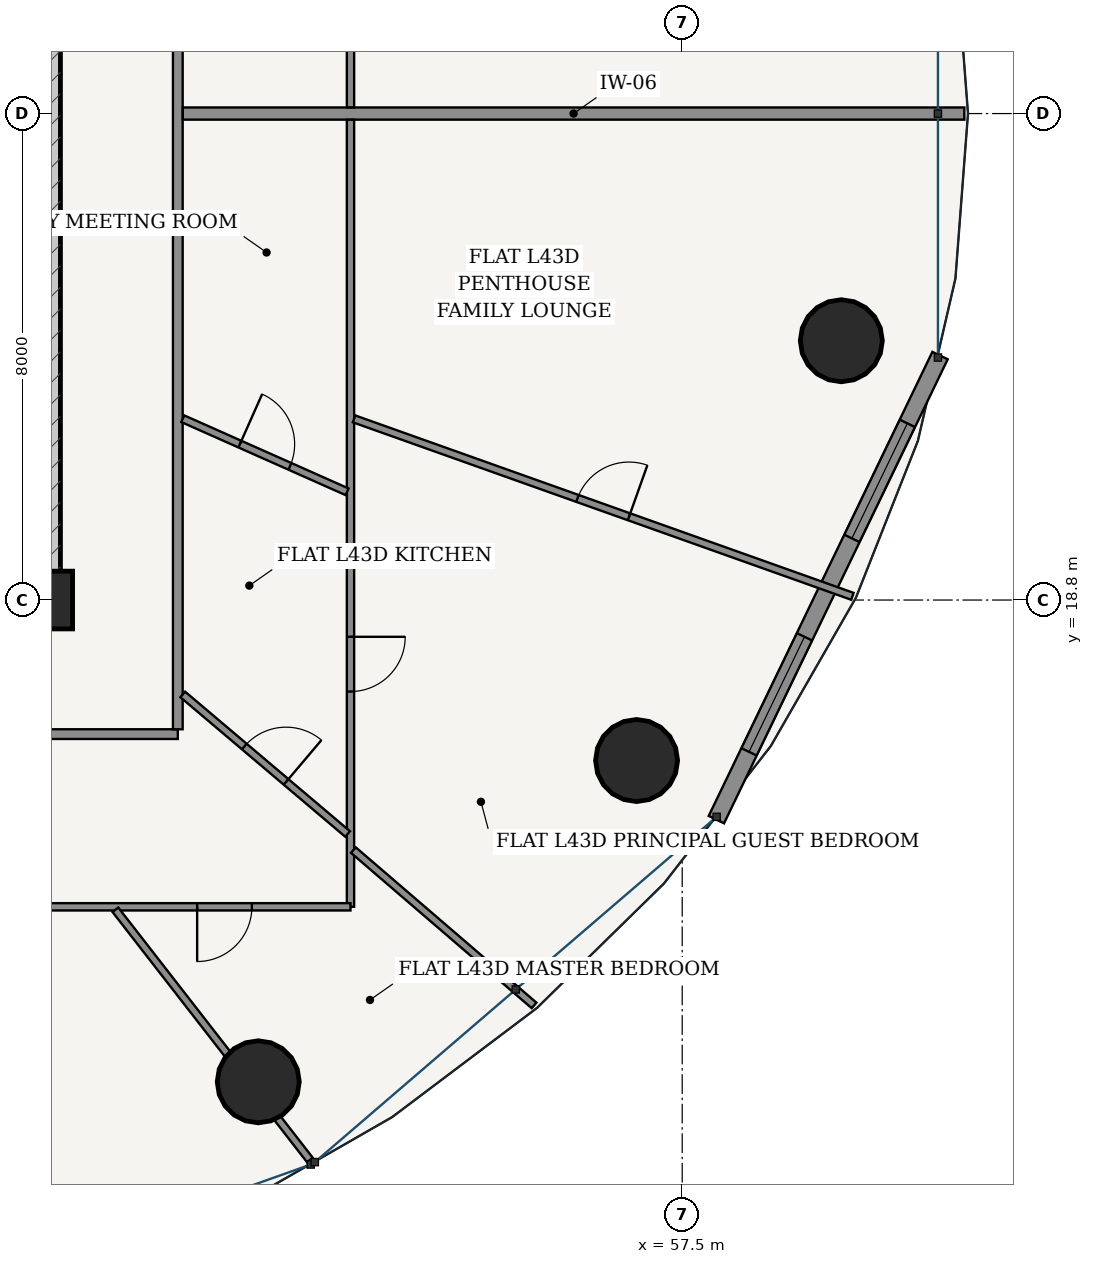
"""IFC4 building model, lengths in metres.
Left out: names, types, materials, properties, quantities, classifications, styles, units other than length and angle.
Written with IfcOpenShell. Run it as: python <this file> out.ifc"""

import sys

from ifc_helpers import new_model, si_unit, direction, frame, frame_2d, origin, origin_2d, place, context, subcontext, project, spatial, rectangle, hollow_circle, extrude, source, transform, mapped, element, fill, save


model = new_model("IFC4")
c1 = context("Model", 3, precision=1e-05, world=origin(), true_north=direction((-0.2419218956, 0.970295726276)))
c2 = subcontext(c1, "Body", "Model", "MODEL_VIEW")
j1 = project(units=[si_unit("LENGTHUNIT", "METRE"), si_unit("PLANEANGLEUNIT", "RADIAN")], contexts=[c1])
p1 = place(None, origin())
s1 = spatial("IfcSite", under=j1, at=p1, CompositionType="ELEMENT")
p2 = place(p1, origin())
s2 = spatial("IfcBuilding", under=s1, at=p2, CompositionType="ELEMENT")
p3 = place(p2, frame((0.0, 0.0, 164.2)))
s3 = spatial("IfcBuildingStorey", under=s2, at=p3, CompositionType="ELEMENT", Elevation=164.2)
p4 = place(p3, frame((47.0, 18.8, 0.0), z_axis=(0.0, 0.0, 1.0), x_axis=(1.0, 0.0, 0.0)))
e1 = element("IfcColumn", 1, at=p4, inside=s3, PredefinedType="COLUMN", context=c2, shape_type="SweptSolid", body=[
    extrude(rectangle(XDim=0.95, YDim=0.95, at=origin_2d()), origin(), (0.0, 0.0, 1.0), 3.6),
])
p5 = place(p3, frame((28.725, 18.85, 0.0), z_axis=(0.0, 0.0, 1.0), x_axis=(1.0, 0.0, 0.0)))
e2 = element("IfcWall", 2, at=p5, inside=s3, PredefinedType="SHEAR", context=c2, shape_type="SweptSolid", body=[
    extrude(rectangle(XDim=18.55, YDim=0.65, at=frame_2d((9.275, 0.0))), origin(), (0.0, 0.0, 1.0), 3.33),
])
p6 = place(p5, frame((8.85, 0.0, 0.0)))
e3 = element("IfcOpeningElement", 3, at=p6, cuts=e2, PredefinedType="OPENING", context=c2, shape_type="SweptSolid", body=[
    extrude(rectangle(XDim=0.85, YDim=2.1, at=frame_2d((0.425, 1.05))), frame((0.0, 0.335, 0.0), z_axis=(0.0, -1.0, 0.0), x_axis=(1.0, 0.0, 0.0)), (0.0, 0.0, 1.0), 0.67),
])
p7 = place(p3, frame((46.95, 19.175, 0.0), z_axis=(0.0, 0.0, 1.0), x_axis=(0.0, 1.0, 0.0)))
e4 = element("IfcWall", 4, at=p7, inside=s3, PredefinedType="SHEAR", context=c2, shape_type="SweptSolid", body=[
    extrude(rectangle(XDim=15.25, YDim=0.65, at=frame_2d((7.625, 0.0))), origin(), (0.0, 0.0, 1.0), 3.33),
])
p8 = place(p7, frame((9.875, 0.0, 0.0)))
e5 = element("IfcOpeningElement", 5, at=p8, cuts=e4, PredefinedType="OPENING", context=c2, shape_type="SweptSolid", body=[
    extrude(rectangle(XDim=1.5, YDim=2.2, at=frame_2d((0.75, 1.1))), frame((0.0, 0.335, 0.0), z_axis=(0.0, -1.0, 0.0), x_axis=(1.0, 0.0, 0.0)), (0.0, 0.0, 1.0), 0.67),
])
for number, where, z_axis, x_axis in (
    (6, (50.528, 10.877, 0.0), (0.0, 0.0, 1.0), (1.0, 0.0, 0.0)),
    (7, (56.75, 16.161, 0.0), (0.0, 0.0, 1.0), (1.0, 0.0, 0.0)),
    (8, (60.117, 23.064, 0.0), (0.0, 0.0, 1.0), (1.0, 0.0, 0.0)),
):
    element("IfcColumn", number, at=place(p3, frame(where, z_axis=z_axis, x_axis=x_axis)), inside=s3, PredefinedType="COLUMN", context=c2, shape_type="SweptSolid", body=[
        extrude(hollow_circle(Radius=0.675, WallThickness=0.042, at=origin_2d()), origin(), (0.0, 0.0, 1.0), 3.6),
    ])
p9 = place(p3, frame((58.062, 15.189, 0.0), z_axis=(0.0, 0.0, 1.0), x_axis=(0.434209827226, 0.900811759437, 0.0)))
e9 = element("IfcWall", 9, at=p9, inside=s3, PredefinedType="SOLIDWALL", context=c2, shape_type="SweptSolid", body=[
    extrude(rectangle(XDim=8.472, YDim=0.28, at=frame_2d((4.236, 0.0))), origin(), (0.0, 0.0, 1.0), 3.33),
])
p10 = place(p9, frame((1.237, 0.0, 0.85)))
e10 = element("IfcOpeningElement", 10, at=p10, cuts=e9, PredefinedType="OPENING", context=c2, shape_type="SweptSolid", body=[
    extrude(rectangle(XDim=2.1, YDim=1.95, at=frame_2d((1.05, 0.975))), frame((0.0, 0.15, 0.0), z_axis=(0.0, -1.0, 0.0), x_axis=(1.0, 0.0, 0.0)), (0.0, 0.0, 1.0), 0.3),
])
p11 = place(p9, frame((5.134, 0.0, 0.85)))
e11 = element("IfcOpeningElement", 11, at=p11, cuts=e9, PredefinedType="OPENING", context=c2, shape_type="SweptSolid", body=[
    extrude(rectangle(XDim=2.1, YDim=1.95, at=frame_2d((1.05, 0.975))), frame((0.0, 0.15, 0.0), z_axis=(0.0, -1.0, 0.0), x_axis=(1.0, 0.0, 0.0)), (0.0, 0.0, 1.0), 0.3),
])
p12 = place(p3, frame((34.32, 16.595, 0.0), z_axis=(0.0, 0.0, 1.0), x_axis=(1.0, 0.0, 0.0)))
e12 = element("IfcWall", 12, at=p12, inside=s3, PredefinedType="PARTITIONING", context=c2, shape_type="SweptSolid", body=[
    extrude(rectangle(XDim=14.885, YDim=0.16, at=frame_2d((7.442, 0.0))), origin(), (0.0, 0.0, 1.0), 2.776),
])
p13 = place(p12, frame((1.484, 0.0, 0.0)))
e13 = element("IfcOpeningElement", 13, at=p13, cuts=e12, PredefinedType="OPENING", context=c2, shape_type="SweptSolid", body=[
    extrude(rectangle(XDim=0.98, YDim=2.2, at=frame_2d((0.49, 1.1))), frame((0.0, 0.09, 0.0), z_axis=(0.0, -1.0, 0.0), x_axis=(1.0, 0.0, 0.0)), (0.0, 0.0, 1.0), 0.18),
])
p14 = place(p12, frame((10.741, 0.0, 0.0)))
e14 = element("IfcOpeningElement", 14, at=p14, cuts=e12, PredefinedType="OPENING", context=c2, shape_type="SweptSolid", body=[
    extrude(rectangle(XDim=0.98, YDim=2.2, at=frame_2d((0.49, 1.1))), frame((0.0, 0.09, 0.0), z_axis=(0.0, -1.0, 0.0), x_axis=(1.0, 0.0, 0.0)), (0.0, 0.0, 1.0), 0.18),
])
p15 = place(p3, frame((49.205, 16.675, 0.0), z_axis=(0.0, 0.0, 1.0), x_axis=(0.0, 1.0, 0.0)))
e15 = element("IfcWall", 15, at=p15, inside=s3, PredefinedType="PARTITIONING", context=c2, shape_type="SweptSolid", body=[
    extrude(rectangle(XDim=18.4, YDim=0.16, at=frame_2d((9.2, 0.0))), origin(), (0.0, 0.0, 1.0), 2.776),
])
p16 = place(p15, frame((15.326, 0.0, 0.0)))
e16 = element("IfcOpeningElement", 16, at=p16, cuts=e15, PredefinedType="OPENING", context=c2, shape_type="SweptSolid", body=[
    extrude(rectangle(XDim=0.98, YDim=2.2, at=frame_2d((0.49, 1.1))), frame((0.0, 0.09, 0.0), z_axis=(0.0, -1.0, 0.0), x_axis=(1.0, 0.0, 0.0)), (0.0, 0.0, 1.0), 0.18),
])
p17 = place(p3, frame((49.287, 26.8, 0.0), z_axis=(0.0, 0.0, 1.0), x_axis=(1.0, 0.0, 0.0)))
e17 = element("IfcWall", 17, at=p17, inside=s3, PredefinedType="PARTITIONING", context=c2, shape_type="SweptSolid", body=[
    extrude(rectangle(XDim=12.853, YDim=0.2, at=frame_2d((6.426, 0.0))), origin(), (0.0, 0.0, 1.0), 2.846),
])
p18 = place(p3, frame((52.045, 37.995, 0.0), z_axis=(0.0, 0.0, 1.0), x_axis=(0.0, -1.0, 0.0)))
e18 = element("IfcWall", 18, at=p18, inside=s3, PredefinedType="PARTITIONING", context=c2, shape_type="SweptSolid", body=[
    extrude(rectangle(XDim=11.093, YDim=0.12, at=frame_2d((5.546, 0.0))), origin(), (0.0, 0.0, 1.0), 2.776),
])
p19 = place(p18, frame((4.638, 0.0, 0.0)))
e19 = element("IfcOpeningElement", 19, at=p19, cuts=e18, PredefinedType="OPENING", context=c2, shape_type="SweptSolid", body=[
    extrude(rectangle(XDim=0.9, YDim=2.15, at=frame_2d((0.45, 1.075))), frame((0.0, 0.07, 0.0), z_axis=(0.0, -1.0, 0.0), x_axis=(1.0, 0.0, 0.0)), (0.0, 0.0, 1.0), 0.14),
])
p20 = place(p3, frame((52.045, 26.698, 0.0), z_axis=(0.0, 0.0, 1.0), x_axis=(0.0, -1.0, 0.0)))
e20 = element("IfcWall", 20, at=p20, inside=s3, PredefinedType="PARTITIONING", context=c2, shape_type="SweptSolid", body=[
    extrude(rectangle(XDim=12.943, YDim=0.12, at=frame_2d((6.472, 0.0))), origin(), (0.0, 0.0, 1.0), 2.776),
])
p21 = place(p20, frame((8.503, 0.0, 0.0)))
e21 = element("IfcOpeningElement", 21, at=p21, cuts=e20, PredefinedType="OPENING", context=c2, shape_type="SweptSolid", body=[
    extrude(rectangle(XDim=0.9, YDim=2.15, at=frame_2d((0.45, 1.075))), frame((0.0, 0.07, 0.0), z_axis=(0.0, -1.0, 0.0), x_axis=(1.0, 0.0, 0.0)), (0.0, 0.0, 1.0), 0.14),
])
p22 = place(p3, frame((52.045, 13.755, 0.0), z_axis=(0.0, 0.0, 1.0), x_axis=(-1.0, 0.0, 0.0)))
e22 = element("IfcWall", 22, at=p22, inside=s3, PredefinedType="PARTITIONING", context=c2, shape_type="SweptSolid", body=[
    extrude(rectangle(XDim=13.943, YDim=0.12, at=frame_2d((6.971, 0.0))), origin(), (0.0, 0.0, 1.0), 2.776),
])
p23 = place(p22, frame((5.9, 0.0, 0.0)))
e23 = element("IfcOpeningElement", 23, at=p23, cuts=e22, PredefinedType="OPENING", context=c2, shape_type="SweptSolid", body=[
    extrude(rectangle(XDim=0.9, YDim=2.15, at=frame_2d((0.45, 1.075))), frame((0.0, 0.07, 0.0), z_axis=(0.0, -1.0, 0.0), x_axis=(1.0, 0.0, 0.0)), (0.0, 0.0, 1.0), 0.14),
])
p24 = place(p22, frame((1.622, 0.0, 0.0)))
e24 = element("IfcOpeningElement", 24, at=p24, cuts=e22, PredefinedType="OPENING", context=c2, shape_type="SweptSolid", body=[
    extrude(rectangle(XDim=0.9, YDim=2.15, at=frame_2d((0.45, 1.075))), frame((0.0, 0.07, 0.0), z_axis=(0.0, -1.0, 0.0), x_axis=(1.0, 0.0, 0.0)), (0.0, 0.0, 1.0), 0.14),
])
p25 = place(p3, frame((48.179, 13.706, 0.0), z_axis=(0.0, 0.0, 1.0), x_axis=(0.613759011764, -0.789493429662, 0.0)))
e25 = element("IfcWall", 25, at=p25, inside=s3, PredefinedType="PARTITIONING", context=c2, shape_type="SweptSolid", body=[
    extrude(rectangle(XDim=5.212, YDim=0.12, at=frame_2d((2.606, 0.0))), origin(), (0.0, 0.0, 1.0), 2.776),
])
p26 = place(p3, frame((52.092, 14.688, 0.0), z_axis=(0.0, 0.0, 1.0), x_axis=(0.758367509429, -0.651827216862, 0.0)))
e26 = element("IfcWall", 26, at=p26, inside=s3, PredefinedType="PARTITIONING", context=c2, shape_type="SweptSolid", body=[
    extrude(rectangle(XDim=3.918, YDim=0.12, at=frame_2d((1.959, 0.0))), origin(), (0.0, 0.0, 1.0), 2.846),
])
p27 = place(p3, frame((52.104, 21.779, 0.0), z_axis=(0.0, 0.0, 1.0), x_axis=(0.942081743482, -0.335383345736, 0.0)))
e27 = element("IfcWall", 27, at=p27, inside=s3, PredefinedType="PARTITIONING", context=c2, shape_type="SweptSolid", body=[
    extrude(rectangle(XDim=8.7, YDim=0.12, at=frame_2d((4.35, 0.0))), origin(), (0.0, 0.0, 1.0), 2.846),
])
p28 = place(p27, frame((3.9, 0.0, 0.0)))
e28 = element("IfcOpeningElement", 28, at=p28, cuts=e27, PredefinedType="OPENING", context=c2, shape_type="SweptSolid", body=[
    extrude(rectangle(XDim=0.9, YDim=2.15, at=frame_2d((0.45, 1.075))), frame((0.0, 0.07, 0.0), z_axis=(0.0, -1.0, 0.0), x_axis=(1.0, 0.0, 0.0)), (0.0, 0.0, 1.0), 0.14),
])
p29 = place(p3, frame((49.287, 17.248, 0.0), z_axis=(0.0, 0.0, 1.0), x_axis=(0.763274158734, -0.646074731443, 0.0)))
e29 = element("IfcWall", 29, at=p29, inside=s3, PredefinedType="PARTITIONING", context=c2, shape_type="SweptSolid", body=[
    extrude(rectangle(XDim=3.552, YDim=0.12, at=frame_2d((1.776, 0.0))), origin(), (0.0, 0.0, 1.0), 3.005),
])
p30 = place(p29, frame((1.326, 0.0, 0.0)))
e30 = element("IfcOpeningElement", 30, at=p30, cuts=e29, PredefinedType="OPENING", context=c2, shape_type="SweptSolid", body=[
    extrude(rectangle(XDim=0.9, YDim=2.15, at=frame_2d((0.45, 1.075))), frame((0.0, 0.07, 0.0), z_axis=(0.0, -1.0, 0.0), x_axis=(1.0, 0.0, 0.0)), (0.0, 0.0, 1.0), 0.14),
])
p31 = place(p3, frame((49.287, 21.781, 0.0), z_axis=(0.0, 0.0, 1.0), x_axis=(0.913743428873, -0.406291700864, 0.0)))
e31 = element("IfcWall", 31, at=p31, inside=s3, PredefinedType="PARTITIONING", context=c2, shape_type="SweptSolid", body=[
    extrude(rectangle(XDim=2.957, YDim=0.12, at=frame_2d((1.478, 0.0))), origin(), (0.0, 0.0, 1.0), 3.33),
])
p32 = place(p31, frame((1.028, 0.0, 0.0)))
e32 = element("IfcOpeningElement", 32, at=p32, cuts=e31, PredefinedType="OPENING", context=c2, shape_type="SweptSolid", body=[
    extrude(rectangle(XDim=0.9, YDim=2.15, at=frame_2d((0.45, 1.075))), frame((0.0, 0.07, 0.0), z_axis=(0.0, -1.0, 0.0), x_axis=(1.0, 0.0, 0.0)), (0.0, 0.0, 1.0), 0.14),
])
m1 = source(origin(), c2, "Body", "SweptSolid", [
    extrude(rectangle(XDim=2.1, YDim=1.95, at=frame_2d((1.05, 0.975))), frame((0.0, 0.03, 0.0), z_axis=(0.0, -1.0, 0.0), x_axis=(1.0, 0.0, 0.0)), (0.0, 0.0, 1.0), 0.06),
])
p33 = place(p10, origin())
e33 = element("IfcWindow", 33, at=p33, inside=s3, PartitioningType="SINGLE_PANEL", PredefinedType="WINDOW", context=c2, shape_type="MappedRepresentation", body=[
    mapped(m1, transform((0.0, 0.0, 0.0), scale=1.0)),
])
fill(e10, e33)
p34 = place(p11, origin())
e34 = element("IfcWindow", 34, at=p34, inside=s3, PartitioningType="SINGLE_PANEL", PredefinedType="WINDOW", context=c2, shape_type="MappedRepresentation", body=[
    mapped(m1, transform((0.0, 0.0, 0.0), scale=1.0)),
])
fill(e11, e34)
m2 = source(origin(), c2, "Body", "SweptSolid", [
    extrude(rectangle(XDim=0.9, YDim=2.15, at=frame_2d((0.45, 1.075))), frame((0.0, 0.025, 0.0), z_axis=(0.0, -1.0, 0.0), x_axis=(1.0, 0.0, 0.0)), (0.0, 0.0, 1.0), 0.05),
])
p35 = place(p30, origin())
e35 = element("IfcDoor", 35, at=p35, inside=s3, OperationType="SINGLE_SWING_RIGHT", PredefinedType="DOOR", context=c2, shape_type="MappedRepresentation", body=[
    mapped(m2, transform((0.0, 0.0, 0.0), scale=1.0)),
])
fill(e30, e35)
p36 = place(p32, origin())
e36 = element("IfcDoor", 36, at=p36, inside=s3, OperationType="SINGLE_SWING_LEFT", PredefinedType="DOOR", context=c2, shape_type="MappedRepresentation", body=[
    mapped(m2, transform((0.0, 0.0, 0.0), scale=1.0)),
])
fill(e32, e36)
p37 = place(p24, origin())
e37 = element("IfcDoor", 37, at=p37, inside=s3, OperationType="SINGLE_SWING_RIGHT", PredefinedType="DOOR", context=c2, shape_type="MappedRepresentation", body=[
    mapped(m2, transform((0.0, 0.0, 0.0), scale=1.0)),
])
fill(e24, e37)
p38 = place(p21, origin())
e38 = element("IfcDoor", 38, at=p38, inside=s3, OperationType="SINGLE_SWING_LEFT", PredefinedType="DOOR", context=c2, shape_type="MappedRepresentation", body=[
    mapped(m2, transform((0.0, 0.0, 0.0), scale=1.0)),
])
fill(e21, e38)
p39 = place(p28, origin())
e39 = element("IfcDoor", 39, at=p39, inside=s3, OperationType="SINGLE_SWING_RIGHT", PredefinedType="DOOR", context=c2, shape_type="MappedRepresentation", body=[
    mapped(m2, transform((0.0, 0.0, 0.0), scale=1.0)),
])
fill(e28, e39)
save(model, sys.argv[1])
